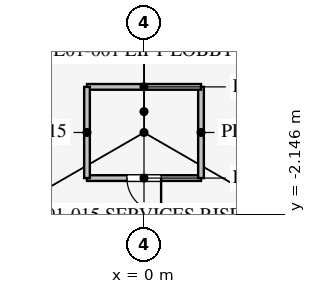
"""IFC4 building model, lengths in metres.
Left out: names, types, materials, properties, quantities, classifications, styles, units other than length and angle.
Written with IfcOpenShell. Run it as: python <this file> out.ifc"""

import sys

from ifc_helpers import new_model, si_unit, direction, frame, frame_2d, origin, place, context, subcontext, project, spatial, rectangle, extrude, element, fill, save


model = new_model("IFC4")
c1 = context("Model", 3, precision=1e-05, world=origin(), true_north=direction((0.0, 1.0)))
c2 = subcontext(c1, "Body", "Model", "MODEL_VIEW")
j1 = project(units=[si_unit("LENGTHUNIT", "METRE"), si_unit("PLANEANGLEUNIT", "RADIAN")], contexts=[c1])
p1 = place(None, origin())
s1 = spatial("IfcSite", under=j1, at=p1, CompositionType="ELEMENT")
p2 = place(p1, origin())
s2 = spatial("IfcBuilding", under=s1, at=p2, CompositionType="ELEMENT")
p3 = place(p2, frame((0.0, 0.0, 6.5)))
s3 = spatial("IfcBuildingStorey", under=s2, at=p3, CompositionType="ELEMENT", Elevation=6.5)
p4 = place(p3, frame((-1.5, -1.2, 0.0), z_axis=(0.0, 0.0, 1.0), x_axis=(1.0, 0.0, 0.0)))
e1 = element("IfcWall", 1, at=p4, inside=s3, PredefinedType="PARTITIONING", context=c2, shape_type="SweptSolid", body=[
    extrude(rectangle(XDim=3.0, YDim=0.15, at=frame_2d((1.5, 0.0))), origin(), (0.0, 0.0, 1.0), 4.8),
])
p5 = place(p4, frame((1.05, 0.0, 0.0)))
e2 = element("IfcOpeningElement", 2, at=p5, cuts=e1, PredefinedType="OPENING", context=c2, shape_type="SweptSolid", body=[
    extrude(rectangle(XDim=0.9, YDim=2.1, at=frame_2d((0.45, 1.05))), frame((0.0, 0.085, 0.0), z_axis=(0.0, -1.0, 0.0), x_axis=(1.0, 0.0, 0.0)), (0.0, 0.0, 1.0), 0.17),
])
p6 = place(p3, frame((1.5, -1.2, 0.0), z_axis=(0.0, 0.0, 1.0), x_axis=(0.0, 1.0, 0.0)))
e3 = element("IfcWall", 3, at=p6, inside=s3, PredefinedType="PARTITIONING", context=c2, shape_type="SweptSolid", body=[
    extrude(rectangle(XDim=2.4, YDim=0.15, at=frame_2d((1.2, 0.0))), origin(), (0.0, 0.0, 1.0), 4.8),
])
p7 = place(p3, frame((1.5, 1.2, 0.0), z_axis=(0.0, 0.0, 1.0), x_axis=(-1.0, 0.0, 0.0)))
e4 = element("IfcWall", 4, at=p7, inside=s3, PredefinedType="PARTITIONING", context=c2, shape_type="SweptSolid", body=[
    extrude(rectangle(XDim=3.0, YDim=0.15, at=frame_2d((1.5, 0.0))), origin(), (0.0, 0.0, 1.0), 4.8),
])
p8 = place(p3, frame((-1.5, 1.2, 0.0), z_axis=(0.0, 0.0, 1.0), x_axis=(0.0, -1.0, 0.0)))
e5 = element("IfcWall", 5, at=p8, inside=s3, PredefinedType="PARTITIONING", context=c2, shape_type="SweptSolid", body=[
    extrude(rectangle(XDim=2.4, YDim=0.15, at=frame_2d((1.2, 0.0))), origin(), (0.0, 0.0, 1.0), 4.8),
])
p9 = place(p5, frame((0.9, 0.0, 0.0), z_axis=(0.0, 0.0, 1.0), x_axis=(-1.0, 0.0, 0.0)))
e6 = element("IfcDoor", 6, at=p9, inside=s3, OperationType="SINGLE_SWING_LEFT", PredefinedType="DOOR", context=c2, shape_type="SweptSolid", body=[
    extrude(rectangle(XDim=0.9, YDim=2.1, at=frame_2d((0.45, 1.05))), frame((0.0, 0.025, 0.0), z_axis=(0.0, -1.0, 0.0), x_axis=(1.0, 0.0, 0.0)), (0.0, 0.0, 1.0), 0.05),
])
fill(e2, e6)
save(model, sys.argv[1])
